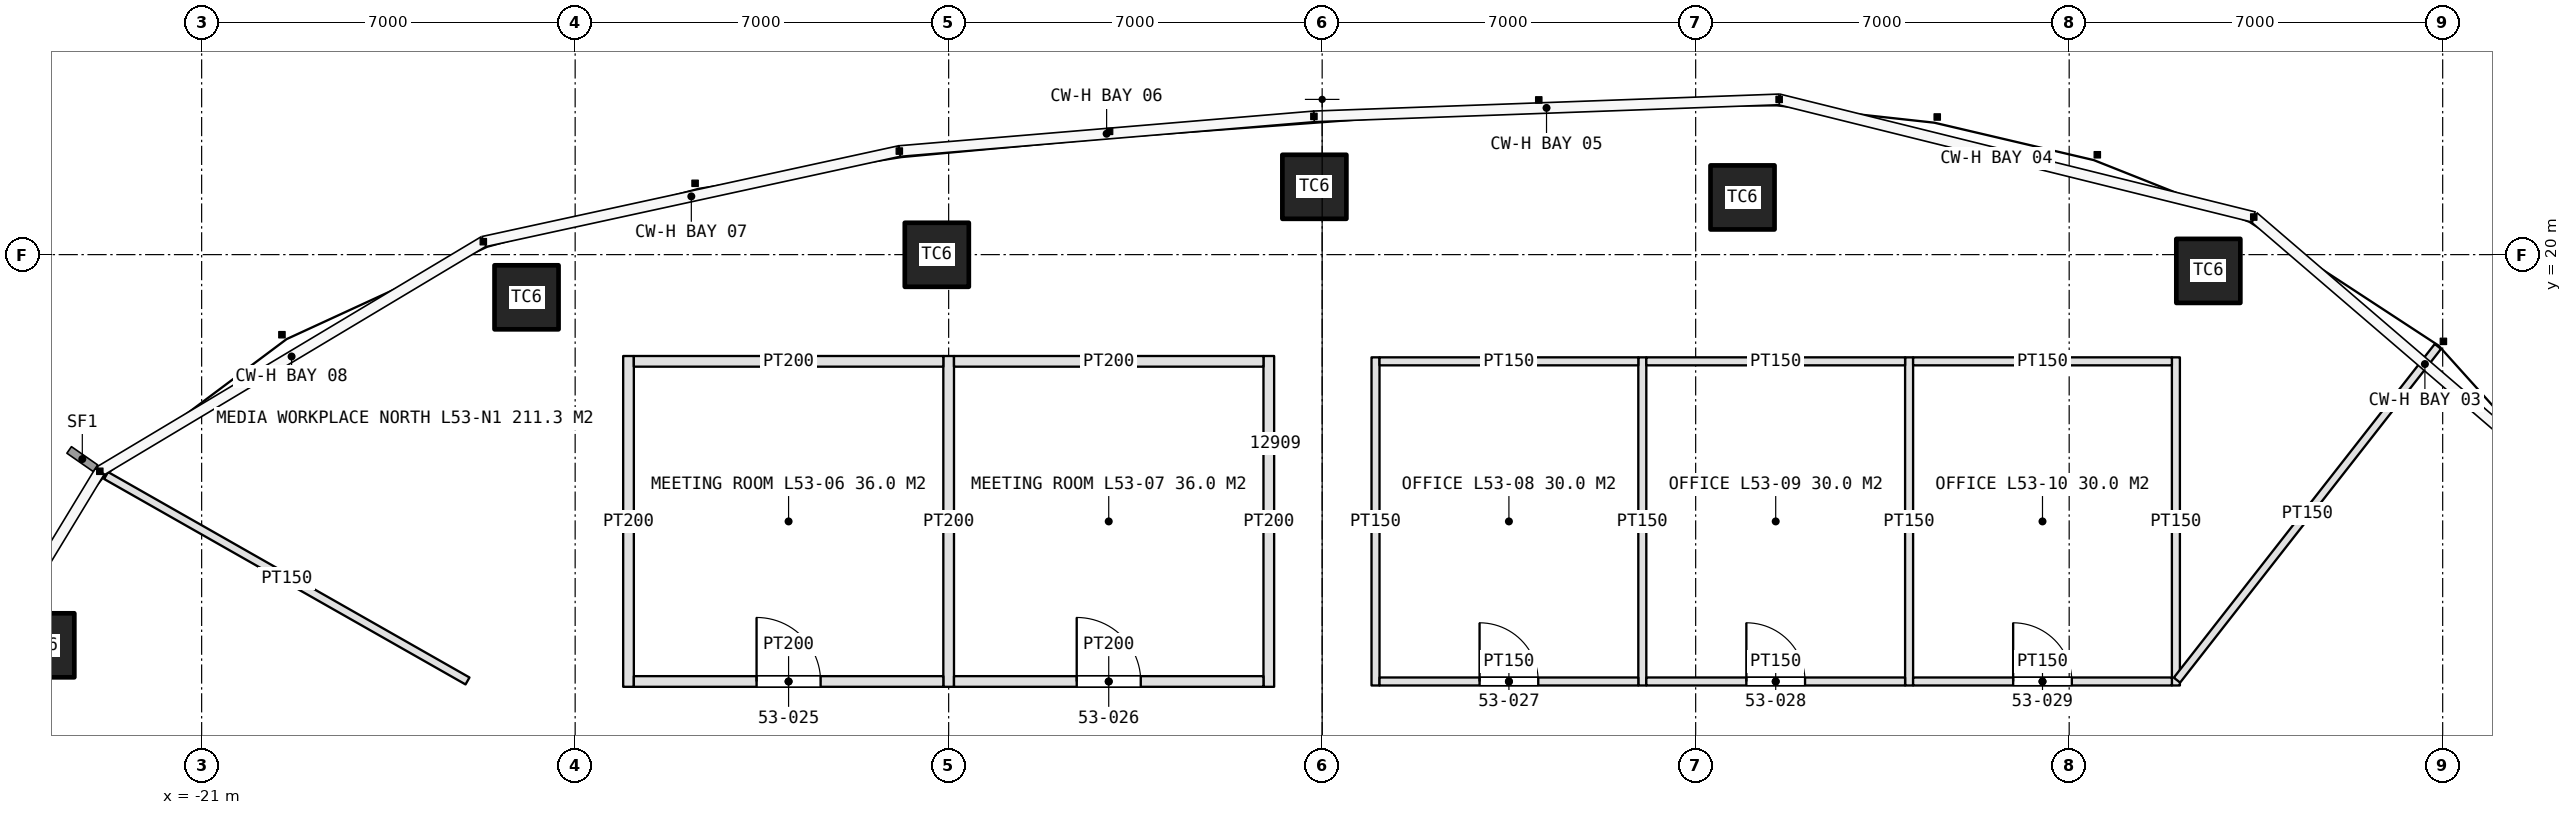
"""IFC4 building model, lengths in metres.
Left out: names, types, materials, properties, quantities, classifications, styles, units other than length and angle.
Written with IfcOpenShell. Run it as: python <this file> out.ifc"""

import sys

from ifc_helpers import new_model, si_unit, direction, frame, frame_2d, origin, origin_2d, place, context, subcontext, project, spatial, rectangle, extrude, element, fill, save


model = new_model("IFC4")
c1 = context("Model", 3, precision=1e-05, world=origin(), true_north=direction((0.0, 1.0)))
c2 = subcontext(c1, "Body", "Model", "MODEL_VIEW")
j1 = project(units=[si_unit("LENGTHUNIT", "METRE"), si_unit("PLANEANGLEUNIT", "RADIAN")], contexts=[c1])
p1 = place(None, origin())
s1 = spatial("IfcSite", under=j1, at=p1, CompositionType="ELEMENT")
p2 = place(p1, origin())
s2 = spatial("IfcBuilding", under=s1, at=p2, CompositionType="ELEMENT")
p3 = place(p2, frame((0.0, 0.0, 241.0)))
s3 = spatial("IfcBuildingStorey", under=s2, at=p3, CompositionType="ELEMENT", Elevation=241.0)
for number, where, z_axis, x_axis in (
    (1, (16.608, 19.695, 0.0), (0.0, 0.0, 1.0), (1.0, 0.0, 0.0)),
    (2, (7.878, 21.072, 0.0), (0.0, 0.0, 1.0), (1.0, 0.0, 0.0)),
    (3, (-0.146, 21.271, 0.0), (0.0, 0.0, 1.0), (1.0, 0.0, 0.0)),
    (4, (-7.222, 19.997, 0.0), (0.0, 0.0, 1.0), (1.0, 0.0, 0.0)),
    (5, (-14.911, 19.2, 0.0), (0.0, 0.0, 1.0), (1.0, 0.0, 0.0)),
    (6, (-23.986, 12.678, 0.0), (0.0, 0.0, 1.0), (1.0, 0.0, 0.0)),
):
    element("IfcColumn", number, at=place(p3, frame(where, z_axis=z_axis, x_axis=x_axis)), inside=s3, PredefinedType="COLUMN", context=c2, shape_type="SweptSolid", body=[
        extrude(rectangle(XDim=1.2, YDim=1.2, at=origin_2d()), origin(), (0.0, 0.0, 1.0), 4.2),
    ])
for number, where, z_axis, x_axis in (
    (7, (-13.0, 11.9, 0.0), (0.0, 0.0, 1.0), (0.0, 1.0, 0.0)),
    (8, (-7.0, 11.9, 0.0), (0.0, 0.0, 1.0), (0.0, 1.0, 0.0)),
    (9, (-1.0, 11.9, 0.0), (0.0, 0.0, 1.0), (0.0, 1.0, 0.0)),
):
    element("IfcWall", number, at=place(p3, frame(where, z_axis=z_axis, x_axis=x_axis)), inside=s3, PredefinedType="PARTITIONING", context=c2, shape_type="SweptSolid", body=[
        extrude(rectangle(XDim=6.2, YDim=0.2, at=frame_2d((3.1, 0.0))), origin(), (0.0, 0.0, 1.0), 3.0),
    ])
p4 = place(p3, frame((-12.9, 12.0, 0.0), z_axis=(0.0, 0.0, 1.0), x_axis=(1.0, 0.0, 0.0)))
e10 = element("IfcWall", 10, at=p4, inside=s3, PredefinedType="PARTITIONING", context=c2, shape_type="SweptSolid", body=[
    extrude(rectangle(XDim=5.8, YDim=0.2, at=frame_2d((2.9, 0.0))), origin(), (0.0, 0.0, 1.0), 3.0),
])
p5 = place(p4, frame((2.3, 0.0, 0.0)))
e11 = element("IfcOpeningElement", 11, at=p5, cuts=e10, PredefinedType="OPENING", context=c2, shape_type="SweptSolid", body=[
    extrude(rectangle(XDim=1.2, YDim=2.4, at=frame_2d((0.6, 1.2))), frame((0.0, 0.11, 0.0), z_axis=(0.0, -1.0, 0.0), x_axis=(1.0, 0.0, 0.0)), (0.0, 0.0, 1.0), 0.22),
])
p6 = place(p3, frame((-12.9, 18.0, 0.0), z_axis=(0.0, 0.0, 1.0), x_axis=(1.0, 0.0, 0.0)))
e12 = element("IfcWall", 12, at=p6, inside=s3, PredefinedType="PARTITIONING", context=c2, shape_type="SweptSolid", body=[
    extrude(rectangle(XDim=5.8, YDim=0.2, at=frame_2d((2.9, 0.0))), origin(), (0.0, 0.0, 1.0), 3.0),
])
p7 = place(p3, frame((-6.9, 12.0, 0.0), z_axis=(0.0, 0.0, 1.0), x_axis=(1.0, 0.0, 0.0)))
e13 = element("IfcWall", 13, at=p7, inside=s3, PredefinedType="PARTITIONING", context=c2, shape_type="SweptSolid", body=[
    extrude(rectangle(XDim=5.8, YDim=0.2, at=frame_2d((2.9, 0.0))), origin(), (0.0, 0.0, 1.0), 3.0),
])
p8 = place(p7, frame((2.3, 0.0, 0.0)))
e14 = element("IfcOpeningElement", 14, at=p8, cuts=e13, PredefinedType="OPENING", context=c2, shape_type="SweptSolid", body=[
    extrude(rectangle(XDim=1.2, YDim=2.4, at=frame_2d((0.6, 1.2))), frame((0.0, 0.11, 0.0), z_axis=(0.0, -1.0, 0.0), x_axis=(1.0, 0.0, 0.0)), (0.0, 0.0, 1.0), 0.22),
])
p9 = place(p3, frame((-6.9, 18.0, 0.0), z_axis=(0.0, 0.0, 1.0), x_axis=(1.0, 0.0, 0.0)))
e15 = element("IfcWall", 15, at=p9, inside=s3, PredefinedType="PARTITIONING", context=c2, shape_type="SweptSolid", body=[
    extrude(rectangle(XDim=5.8, YDim=0.2, at=frame_2d((2.9, 0.0))), origin(), (0.0, 0.0, 1.0), 3.0),
])
for number, where, z_axis, x_axis in (
    (16, (1.0, 11.925, 0.0), (0.0, 0.0, 1.0), (0.0, 1.0, 0.0)),
    (17, (6.0, 11.925, 0.0), (0.0, 0.0, 1.0), (0.0, 1.0, 0.0)),
    (18, (11.0, 11.925, 0.0), (0.0, 0.0, 1.0), (0.0, 1.0, 0.0)),
    (19, (16.0, 11.925, 0.0), (0.0, 0.0, 1.0), (0.0, 1.0, 0.0)),
):
    element("IfcWall", number, at=place(p3, frame(where, z_axis=z_axis, x_axis=x_axis)), inside=s3, PredefinedType="PARTITIONING", context=c2, shape_type="SweptSolid", body=[
        extrude(rectangle(XDim=6.15, YDim=0.15, at=frame_2d((3.075, 0.0))), origin(), (0.0, 0.0, 1.0), 3.0),
    ])
p10 = place(p3, frame((1.075, 12.0, 0.0), z_axis=(0.0, 0.0, 1.0), x_axis=(1.0, 0.0, 0.0)))
e20 = element("IfcWall", 20, at=p10, inside=s3, PredefinedType="PARTITIONING", context=c2, shape_type="SweptSolid", body=[
    extrude(rectangle(XDim=4.85, YDim=0.15, at=frame_2d((2.425, 0.0))), origin(), (0.0, 0.0, 1.0), 3.0),
])
p11 = place(p10, frame((1.875, 0.0, 0.0)))
e21 = element("IfcOpeningElement", 21, at=p11, cuts=e20, PredefinedType="OPENING", context=c2, shape_type="SweptSolid", body=[
    extrude(rectangle(XDim=1.1, YDim=2.3, at=frame_2d((0.55, 1.15))), frame((0.0, 0.085, 0.0), z_axis=(0.0, -1.0, 0.0), x_axis=(1.0, 0.0, 0.0)), (0.0, 0.0, 1.0), 0.17),
])
p12 = place(p3, frame((1.075, 18.0, 0.0), z_axis=(0.0, 0.0, 1.0), x_axis=(1.0, 0.0, 0.0)))
e22 = element("IfcWall", 22, at=p12, inside=s3, PredefinedType="PARTITIONING", context=c2, shape_type="SweptSolid", body=[
    extrude(rectangle(XDim=4.85, YDim=0.15, at=frame_2d((2.425, 0.0))), origin(), (0.0, 0.0, 1.0), 3.0),
])
p13 = place(p3, frame((6.075, 12.0, 0.0), z_axis=(0.0, 0.0, 1.0), x_axis=(1.0, 0.0, 0.0)))
e23 = element("IfcWall", 23, at=p13, inside=s3, PredefinedType="PARTITIONING", context=c2, shape_type="SweptSolid", body=[
    extrude(rectangle(XDim=4.85, YDim=0.15, at=frame_2d((2.425, 0.0))), origin(), (0.0, 0.0, 1.0), 3.0),
])
p14 = place(p13, frame((1.875, 0.0, 0.0)))
e24 = element("IfcOpeningElement", 24, at=p14, cuts=e23, PredefinedType="OPENING", context=c2, shape_type="SweptSolid", body=[
    extrude(rectangle(XDim=1.1, YDim=2.3, at=frame_2d((0.55, 1.15))), frame((0.0, 0.085, 0.0), z_axis=(0.0, -1.0, 0.0), x_axis=(1.0, 0.0, 0.0)), (0.0, 0.0, 1.0), 0.17),
])
p15 = place(p3, frame((6.075, 18.0, 0.0), z_axis=(0.0, 0.0, 1.0), x_axis=(1.0, 0.0, 0.0)))
e25 = element("IfcWall", 25, at=p15, inside=s3, PredefinedType="PARTITIONING", context=c2, shape_type="SweptSolid", body=[
    extrude(rectangle(XDim=4.85, YDim=0.15, at=frame_2d((2.425, 0.0))), origin(), (0.0, 0.0, 1.0), 3.0),
])
p16 = place(p3, frame((11.075, 12.0, 0.0), z_axis=(0.0, 0.0, 1.0), x_axis=(1.0, 0.0, 0.0)))
e26 = element("IfcWall", 26, at=p16, inside=s3, PredefinedType="PARTITIONING", context=c2, shape_type="SweptSolid", body=[
    extrude(rectangle(XDim=4.85, YDim=0.15, at=frame_2d((2.425, 0.0))), origin(), (0.0, 0.0, 1.0), 3.0),
])
p17 = place(p16, frame((1.875, 0.0, 0.0)))
e27 = element("IfcOpeningElement", 27, at=p17, cuts=e26, PredefinedType="OPENING", context=c2, shape_type="SweptSolid", body=[
    extrude(rectangle(XDim=1.1, YDim=2.3, at=frame_2d((0.55, 1.15))), frame((0.0, 0.085, 0.0), z_axis=(0.0, -1.0, 0.0), x_axis=(1.0, 0.0, 0.0)), (0.0, 0.0, 1.0), 0.17),
])
p18 = place(p3, frame((11.075, 18.0, 0.0), z_axis=(0.0, 0.0, 1.0), x_axis=(1.0, 0.0, 0.0)))
e28 = element("IfcWall", 28, at=p18, inside=s3, PredefinedType="PARTITIONING", context=c2, shape_type="SweptSolid", body=[
    extrude(rectangle(XDim=4.85, YDim=0.15, at=frame_2d((2.425, 0.0))), origin(), (0.0, 0.0, 1.0), 3.0),
])
p19 = place(p3, frame((-16.017, 12.01, 0.0), z_axis=(0.0, 0.0, 1.0), x_axis=(-0.869357432803, 0.494183826151, 0.0)))
e29 = element("IfcWall", 29, at=p19, inside=s3, PredefinedType="PARTITIONING", context=c2, shape_type="SweptSolid", body=[
    extrude(rectangle(XDim=7.791, YDim=0.15, at=frame_2d((3.896, 0.0))), origin(), (0.0, 0.0, 1.0), 3.0),
])
p20 = place(p3, frame((16.02, 12.026, 0.0), z_axis=(0.0, 0.0, 1.0), x_axis=(0.616031272047, 0.787721696959, 0.0)))
e30 = element("IfcWall", 30, at=p20, inside=s3, PredefinedType="PARTITIONING", context=c2, shape_type="SweptSolid", body=[
    extrude(rectangle(XDim=7.939, YDim=0.15, at=frame_2d((3.969, 0.0))), origin(), (0.0, 0.0, 1.0), 3.0),
])
p21 = place(p5, origin())
e31 = element("IfcDoor", 31, at=p21, inside=s3, OperationType="SINGLE_SWING_LEFT", PredefinedType="DOOR", context=c2, shape_type="SweptSolid", body=[
    extrude(rectangle(XDim=1.2, YDim=2.4, at=frame_2d((0.6, 1.2))), frame((0.0, 0.025, 0.0), z_axis=(0.0, -1.0, 0.0), x_axis=(1.0, 0.0, 0.0)), (0.0, 0.0, 1.0), 0.05),
])
fill(e11, e31)
p22 = place(p8, origin())
e32 = element("IfcDoor", 32, at=p22, inside=s3, OperationType="SINGLE_SWING_LEFT", PredefinedType="DOOR", context=c2, shape_type="SweptSolid", body=[
    extrude(rectangle(XDim=1.2, YDim=2.4, at=frame_2d((0.6, 1.2))), frame((0.0, 0.025, 0.0), z_axis=(0.0, -1.0, 0.0), x_axis=(1.0, 0.0, 0.0)), (0.0, 0.0, 1.0), 0.05),
])
fill(e14, e32)
p23 = place(p11, origin())
e33 = element("IfcDoor", 33, at=p23, inside=s3, OperationType="SINGLE_SWING_LEFT", PredefinedType="DOOR", context=c2, shape_type="SweptSolid", body=[
    extrude(rectangle(XDim=1.1, YDim=2.3, at=frame_2d((0.55, 1.15))), frame((0.0, 0.025, 0.0), z_axis=(0.0, -1.0, 0.0), x_axis=(1.0, 0.0, 0.0)), (0.0, 0.0, 1.0), 0.05),
])
fill(e21, e33)
p24 = place(p14, origin())
e34 = element("IfcDoor", 34, at=p24, inside=s3, OperationType="SINGLE_SWING_LEFT", PredefinedType="DOOR", context=c2, shape_type="SweptSolid", body=[
    extrude(rectangle(XDim=1.1, YDim=2.3, at=frame_2d((0.55, 1.15))), frame((0.0, 0.025, 0.0), z_axis=(0.0, -1.0, 0.0), x_axis=(1.0, 0.0, 0.0)), (0.0, 0.0, 1.0), 0.05),
])
fill(e24, e34)
p25 = place(p17, origin())
e35 = element("IfcDoor", 35, at=p25, inside=s3, OperationType="SINGLE_SWING_LEFT", PredefinedType="DOOR", context=c2, shape_type="SweptSolid", body=[
    extrude(rectangle(XDim=1.1, YDim=2.3, at=frame_2d((0.55, 1.15))), frame((0.0, 0.025, 0.0), z_axis=(0.0, -1.0, 0.0), x_axis=(1.0, 0.0, 0.0)), (0.0, 0.0, 1.0), 0.05),
])
fill(e27, e35)
save(model, sys.argv[1])
